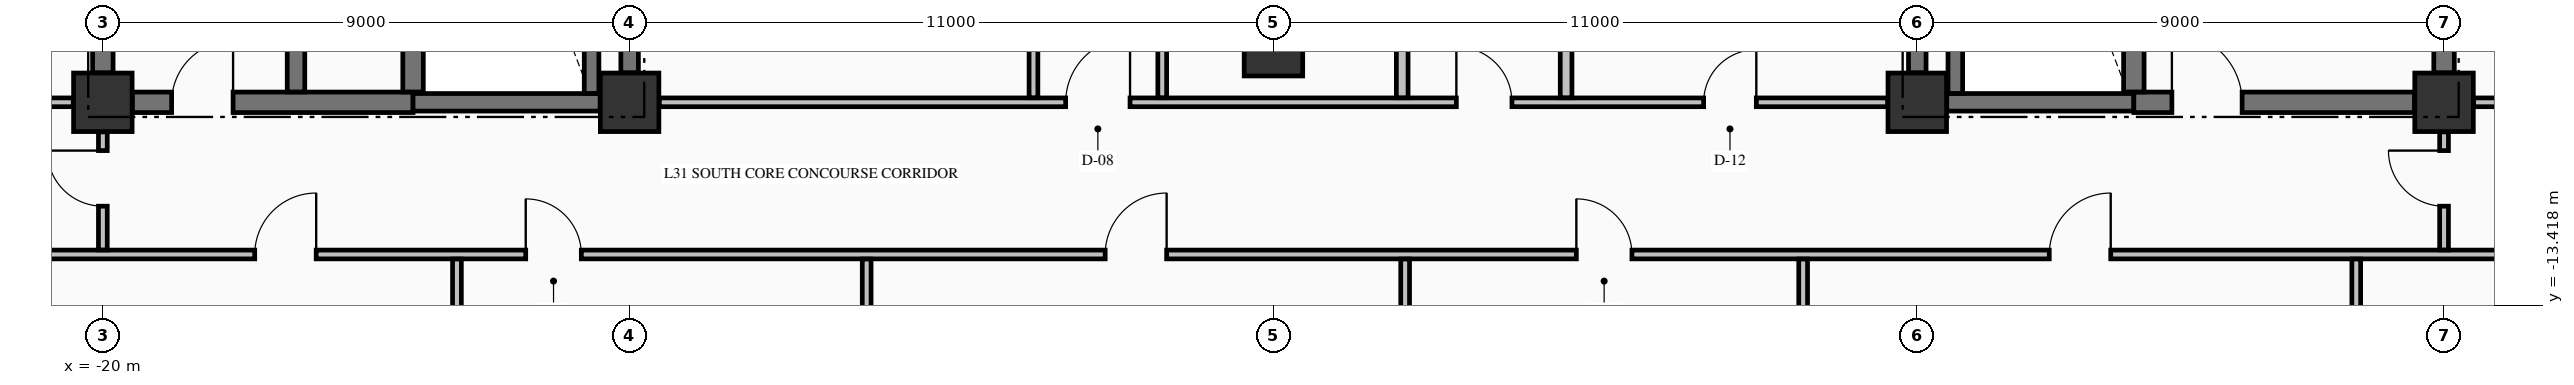
"""IFC4 building model, lengths in metres.
Left out: names, types, materials, properties, quantities, classifications, styles, units other than length and angle.
Written with IfcOpenShell. Run it as: python <this file> out.ifc"""

import sys

from ifc_helpers import new_model, si_unit, direction, frame, frame_2d, origin, origin_2d, place, context, subcontext, project, spatial, rectangle, extrude, element, fill, save


model = new_model("IFC4")
c1 = context("Model", 3, precision=1e-05, world=origin(), true_north=direction((0.0, 1.0)))
c2 = subcontext(c1, "Body", "Model", "MODEL_VIEW")
j1 = project(units=[si_unit("LENGTHUNIT", "METRE"), si_unit("PLANEANGLEUNIT", "RADIAN")], contexts=[c1])
p1 = place(None, origin())
s1 = spatial("IfcSite", under=j1, at=p1, CompositionType="ELEMENT")
p2 = place(p1, origin())
s2 = spatial("IfcBuilding", under=s1, at=p2, CompositionType="ELEMENT")
p3 = place(p2, frame((0.0, 0.0, 124.92)))
s3 = spatial("IfcBuildingStorey", under=s2, at=p3, CompositionType="ELEMENT", Elevation=124.92)
for number, where, z_axis, x_axis in (
    (1, (-20.0, -9.95, -0.25), (0.0, 0.0, 1.0), (1.0, 0.0, 0.0)),
    (2, (-11.0, -9.95, -0.25), (0.0, 0.0, 1.0), (1.0, 0.0, 0.0)),
    (3, (11.0, -9.95, -0.25), (0.0, 0.0, 1.0), (1.0, 0.0, 0.0)),
    (4, (20.0, -9.95, -0.25), (0.0, 0.0, 1.0), (1.0, 0.0, 0.0)),
    (5, (0.0, -9.0, -0.25), (0.0, 0.0, 1.0), (1.0, 0.0, 0.0)),
):
    element("IfcColumn", number, at=place(p3, frame(where, z_axis=z_axis, x_axis=x_axis)), inside=s3, PredefinedType="COLUMN", context=c2, shape_type="SweptSolid", body=[
        extrude(rectangle(XDim=1.0, YDim=1.0, at=origin_2d()), origin(), (0.0, 0.0, 1.0), 3.57),
    ])
p4 = place(p3, frame((-19.496, -9.95, 0.0), z_axis=(0.0, 0.0, 1.0), x_axis=(1.0, 0.0, 0.0)))
e6 = element("IfcWall", 6, at=p4, inside=s3, PredefinedType="SHEAR", context=c2, shape_type="SweptSolid", body=[
    extrude(rectangle(XDim=4.796, YDim=0.35, at=frame_2d((2.398, 0.0))), origin(), (0.0, 0.0, 1.0), 3.32),
])
p5 = place(p4, frame((0.671, 0.0, 0.0)))
e7 = element("IfcOpeningElement", 7, at=p5, cuts=e6, PredefinedType="OPENING", context=c2, shape_type="SweptSolid", body=[
    extrude(rectangle(XDim=1.05, YDim=2.15, at=frame_2d((0.525, 1.075))), frame((0.0, 0.185, 0.0), z_axis=(0.0, -1.0, 0.0), x_axis=(1.0, 0.0, 0.0)), (0.0, 0.0, 1.0), 0.37),
])
for number, where, z_axis, x_axis in (
    (8, (-14.7, -9.95, 0.0), (0.0, 0.0, 1.0), (1.0, 0.0, 0.0)),
    (9, (11.504, -9.95, 0.0), (0.0, 0.0, 1.0), (1.0, 0.0, 0.0)),
):
    element("IfcWall", number, at=place(p3, frame(where, z_axis=z_axis, x_axis=x_axis)), inside=s3, PredefinedType="SHEAR", context=c2, shape_type="SweptSolid", body=[
        extrude(rectangle(XDim=3.196, YDim=0.3, at=frame_2d((1.598, 0.0))), origin(), (0.0, 0.0, 1.0), 3.32),
    ])
p6 = place(p3, frame((14.7, -9.95, 0.0), z_axis=(0.0, 0.0, 1.0), x_axis=(1.0, 0.0, 0.0)))
e10 = element("IfcWall", 10, at=p6, inside=s3, PredefinedType="SHEAR", context=c2, shape_type="SweptSolid", body=[
    extrude(rectangle(XDim=4.796, YDim=0.35, at=frame_2d((2.398, 0.0))), origin(), (0.0, 0.0, 1.0), 3.32),
])
p7 = place(p6, frame((0.65, 0.0, 0.0)))
e11 = element("IfcOpeningElement", 11, at=p7, cuts=e10, PredefinedType="OPENING", context=c2, shape_type="SweptSolid", body=[
    extrude(rectangle(XDim=1.2, YDim=2.15, at=frame_2d((0.6, 1.075))), frame((0.0, 0.185, 0.0), z_axis=(0.0, -1.0, 0.0), x_axis=(1.0, 0.0, 0.0)), (0.0, 0.0, 1.0), 0.37),
])
p8 = place(p3, frame((-27.835, -12.55, 0.0), z_axis=(0.0, 0.0, 1.0), x_axis=(1.0, 0.0, 0.0)))
e12 = element("IfcWall", 12, at=p8, inside=s3, PredefinedType="PARTITIONING", context=c2, shape_type="SweptSolid", body=[
    extrude(rectangle(XDim=50.67, YDim=0.15, at=frame_2d((25.335, 0.0))), origin(), (0.0, 0.0, 1.0), 3.32),
])
p9 = place(p8, frame((10.43, 0.0, 0.0)))
e13 = element("IfcOpeningElement", 13, at=p9, cuts=e12, PredefinedType="OPENING", context=c2, shape_type="SweptSolid", body=[
    extrude(rectangle(XDim=1.05, YDim=2.15, at=frame_2d((0.525, 1.075))), frame((0.0, 0.085, 0.0), z_axis=(0.0, -1.0, 0.0), x_axis=(1.0, 0.0, 0.0)), (0.0, 0.0, 1.0), 0.17),
])
p10 = place(p8, frame((15.06, 0.0, 0.0)))
e14 = element("IfcOpeningElement", 14, at=p10, cuts=e12, PredefinedType="OPENING", context=c2, shape_type="SweptSolid", body=[
    extrude(rectangle(XDim=0.95, YDim=2.15, at=frame_2d((0.475, 1.075))), frame((0.0, 0.085, 0.0), z_axis=(0.0, -1.0, 0.0), x_axis=(1.0, 0.0, 0.0)), (0.0, 0.0, 1.0), 0.17),
])
p11 = place(p8, frame((24.96, 0.0, 0.0)))
e15 = element("IfcOpeningElement", 15, at=p11, cuts=e12, PredefinedType="OPENING", context=c2, shape_type="SweptSolid", body=[
    extrude(rectangle(XDim=1.05, YDim=2.15, at=frame_2d((0.525, 1.075))), frame((0.0, 0.085, 0.0), z_axis=(0.0, -1.0, 0.0), x_axis=(1.0, 0.0, 0.0)), (0.0, 0.0, 1.0), 0.17),
])
p12 = place(p8, frame((33.01, 0.0, 0.0)))
e16 = element("IfcOpeningElement", 16, at=p12, cuts=e12, PredefinedType="OPENING", context=c2, shape_type="SweptSolid", body=[
    extrude(rectangle(XDim=0.95, YDim=2.15, at=frame_2d((0.475, 1.075))), frame((0.0, 0.085, 0.0), z_axis=(0.0, -1.0, 0.0), x_axis=(1.0, 0.0, 0.0)), (0.0, 0.0, 1.0), 0.17),
])
p13 = place(p8, frame((41.09, 0.0, 0.0)))
e17 = element("IfcOpeningElement", 17, at=p13, cuts=e12, PredefinedType="OPENING", context=c2, shape_type="SweptSolid", body=[
    extrude(rectangle(XDim=1.05, YDim=2.15, at=frame_2d((0.525, 1.075))), frame((0.0, 0.085, 0.0), z_axis=(0.0, -1.0, 0.0), x_axis=(1.0, 0.0, 0.0)), (0.0, 0.0, 1.0), 0.17),
])
p14 = place(p3, frame((-27.835, -9.95, 0.0), z_axis=(0.0, 0.0, 1.0), x_axis=(1.0, 0.0, 0.0)))
e18 = element("IfcWall", 18, at=p14, inside=s3, PredefinedType="PARTITIONING", context=c2, shape_type="SweptSolid", body=[
    extrude(rectangle(XDim=7.329, YDim=0.15, at=frame_2d((3.665, 0.0))), origin(), (0.0, 0.0, 1.0), 3.32),
])
p15 = place(p14, frame((3.335, 0.0, 0.0)))
e19 = element("IfcOpeningElement", 19, at=p15, cuts=e18, PredefinedType="OPENING", context=c2, shape_type="SweptSolid", body=[
    extrude(rectangle(XDim=1.0, YDim=2.15, at=frame_2d((0.5, 1.075))), frame((0.0, 0.085, 0.0), z_axis=(0.0, -1.0, 0.0), x_axis=(1.0, 0.0, 0.0)), (0.0, 0.0, 1.0), 0.17),
])
p16 = place(p3, frame((-10.494, -9.95, 0.0), z_axis=(0.0, 0.0, 1.0), x_axis=(1.0, 0.0, 0.0)))
e20 = element("IfcWall", 20, at=p16, inside=s3, PredefinedType="PARTITIONING", context=c2, shape_type="SweptSolid", body=[
    extrude(rectangle(XDim=20.988, YDim=0.15, at=frame_2d((10.494, 0.0))), origin(), (0.0, 0.0, 1.0), 3.32),
])
p17 = place(p16, frame((6.944, 0.0, 0.0)))
e21 = element("IfcOpeningElement", 21, at=p17, cuts=e20, PredefinedType="OPENING", context=c2, shape_type="SweptSolid", body=[
    extrude(rectangle(XDim=1.1, YDim=2.15, at=frame_2d((0.55, 1.075))), frame((0.0, 0.085, 0.0), z_axis=(0.0, -1.0, 0.0), x_axis=(1.0, 0.0, 0.0)), (0.0, 0.0, 1.0), 0.17),
])
p18 = place(p16, frame((13.619, 0.0, 0.0)))
e22 = element("IfcOpeningElement", 22, at=p18, cuts=e20, PredefinedType="OPENING", context=c2, shape_type="SweptSolid", body=[
    extrude(rectangle(XDim=0.95, YDim=2.15, at=frame_2d((0.475, 1.075))), frame((0.0, 0.085, 0.0), z_axis=(0.0, -1.0, 0.0), x_axis=(1.0, 0.0, 0.0)), (0.0, 0.0, 1.0), 0.17),
])
p19 = place(p16, frame((17.844, 0.0, 0.0)))
e23 = element("IfcOpeningElement", 23, at=p19, cuts=e20, PredefinedType="OPENING", context=c2, shape_type="SweptSolid", body=[
    extrude(rectangle(XDim=0.9, YDim=2.15, at=frame_2d((0.45, 1.075))), frame((0.0, 0.085, 0.0), z_axis=(0.0, -1.0, 0.0), x_axis=(1.0, 0.0, 0.0)), (0.0, 0.0, 1.0), 0.17),
])
p20 = place(p3, frame((20.506, -9.95, 0.0), z_axis=(0.0, 0.0, 1.0), x_axis=(1.0, 0.0, 0.0)))
e24 = element("IfcWall", 24, at=p20, inside=s3, PredefinedType="PARTITIONING", context=c2, shape_type="SweptSolid", body=[
    extrude(rectangle(XDim=2.329, YDim=0.15, at=frame_2d((1.165, 0.0))), origin(), (0.0, 0.0, 1.0), 3.32),
])
p21 = place(p20, frame((0.519, 0.0, 0.0)))
e25 = element("IfcOpeningElement", 25, at=p21, cuts=e24, PredefinedType="OPENING", context=c2, shape_type="SweptSolid", body=[
    extrude(rectangle(XDim=0.95, YDim=2.15, at=frame_2d((0.475, 1.075))), frame((0.0, 0.085, 0.0), z_axis=(0.0, -1.0, 0.0), x_axis=(1.0, 0.0, 0.0)), (0.0, 0.0, 1.0), 0.17),
])
p22 = place(p3, frame((-20.0, -9.446, 0.0), z_axis=(0.0, 0.0, 1.0), x_axis=(0.0, 1.0, 0.0)))
e26 = element("IfcWall", 26, at=p22, inside=s3, PredefinedType="SHEAR", context=c2, shape_type="SweptSolid", body=[
    extrude(rectangle(XDim=8.942, YDim=0.35, at=frame_2d((4.471, 0.0))), origin(), (0.0, 0.0, 1.0), 3.32),
])
p23 = place(p3, frame((-16.7, -9.773, 0.0), z_axis=(0.0, 0.0, 1.0), x_axis=(0.0, 1.0, 0.0)))
e27 = element("IfcWall", 27, at=p23, inside=s3, PredefinedType="SHEAR", context=c2, shape_type="SweptSolid", body=[
    extrude(rectangle(XDim=9.371, YDim=0.3, at=frame_2d((4.686, 0.0))), origin(), (0.0, 0.0, 1.0), 3.32),
])
p24 = place(p3, frame((-14.7, -9.773, 0.0), z_axis=(0.0, 0.0, 1.0), x_axis=(0.0, 1.0, 0.0)))
e28 = element("IfcWall", 28, at=p24, inside=s3, PredefinedType="SHEAR", context=c2, shape_type="SweptSolid", body=[
    extrude(rectangle(XDim=9.371, YDim=0.35, at=frame_2d((4.686, 0.0))), origin(), (0.0, 0.0, 1.0), 3.32),
])
p25 = place(p3, frame((-11.65, -9.798, 0.0), z_axis=(0.0, 0.0, 1.0), x_axis=(0.0, 1.0, 0.0)))
e29 = element("IfcWall", 29, at=p25, inside=s3, PredefinedType="SOLIDWALL", context=c2, shape_type="SweptSolid", body=[
    extrude(rectangle(XDim=9.396, YDim=0.25, at=frame_2d((4.698, 0.0))), origin(), (0.0, 0.0, 1.0), 3.32),
])
for number, where, z_axis, x_axis in (
    (30, (-11.0, -9.446, 0.0), (0.0, 0.0, 1.0), (0.0, 1.0, 0.0)),
    (31, (11.0, -9.446, 0.0), (0.0, 0.0, 1.0), (0.0, 1.0, 0.0)),
):
    element("IfcWall", number, at=place(p3, frame(where, z_axis=z_axis, x_axis=x_axis)), inside=s3, PredefinedType="SHEAR", context=c2, shape_type="SweptSolid", body=[
        extrude(rectangle(XDim=8.942, YDim=0.3, at=frame_2d((4.471, 0.0))), origin(), (0.0, 0.0, 1.0), 3.32),
    ])
p26 = place(p3, frame((11.65, -9.798, 0.0), z_axis=(0.0, 0.0, 1.0), x_axis=(0.0, 1.0, 0.0)))
e32 = element("IfcWall", 32, at=p26, inside=s3, PredefinedType="SOLIDWALL", context=c2, shape_type="SweptSolid", body=[
    extrude(rectangle(XDim=9.396, YDim=0.25, at=frame_2d((4.698, 0.0))), origin(), (0.0, 0.0, 1.0), 3.32),
])
p27 = place(p3, frame((14.7, -9.773, 0.0), z_axis=(0.0, 0.0, 1.0), x_axis=(0.0, 1.0, 0.0)))
e33 = element("IfcWall", 33, at=p27, inside=s3, PredefinedType="SHEAR", context=c2, shape_type="SweptSolid", body=[
    extrude(rectangle(XDim=9.371, YDim=0.35, at=frame_2d((4.686, 0.0))), origin(), (0.0, 0.0, 1.0), 3.32),
])
p28 = place(p3, frame((20.0, -9.446, 0.0), z_axis=(0.0, 0.0, 1.0), x_axis=(0.0, 1.0, 0.0)))
e34 = element("IfcWall", 34, at=p28, inside=s3, PredefinedType="SHEAR", context=c2, shape_type="SweptSolid", body=[
    extrude(rectangle(XDim=2.269, YDim=0.35, at=frame_2d((1.135, 0.0))), origin(), (0.0, 0.0, 1.0), 3.32),
])
p29 = place(p3, frame((-20.0, -12.472, 0.0), z_axis=(0.0, 0.0, 1.0), x_axis=(0.0, 1.0, 0.0)))
e35 = element("IfcWall", 35, at=p29, inside=s3, PredefinedType="PARTITIONING", context=c2, shape_type="SweptSolid", body=[
    extrude(rectangle(XDim=2.016, YDim=0.15, at=frame_2d((1.008, 0.0))), origin(), (0.0, 0.0, 1.0), 2.81),
])
p30 = place(p29, frame((0.747, 0.0, 0.0)))
e36 = element("IfcOpeningElement", 36, at=p30, cuts=e35, PredefinedType="OPENING", context=c2, shape_type="SweptSolid", body=[
    extrude(rectangle(XDim=0.95, YDim=2.15, at=frame_2d((0.475, 1.075))), frame((0.0, 0.085, 0.0), z_axis=(0.0, -1.0, 0.0), x_axis=(1.0, 0.0, 0.0)), (0.0, 0.0, 1.0), 0.17),
])
for number, where, z_axis, x_axis in (
    (37, (-13.95, -25.335, 0.0), (0.0, 0.0, 1.0), (0.0, 1.0, 0.0)),
    (38, (-6.95, -25.335, 0.0), (0.0, 0.0, 1.0), (0.0, 1.0, 0.0)),
):
    element("IfcWall", number, at=place(p3, frame(where, z_axis=z_axis, x_axis=x_axis)), inside=s3, PredefinedType="PARTITIONING", context=c2, shape_type="SweptSolid", body=[
        extrude(rectangle(XDim=12.707, YDim=0.15, at=frame_2d((6.354, 0.0))), origin(), (0.0, 0.0, 1.0), 3.32),
    ])
p31 = place(p3, frame((-4.1, -9.872, 0.0), z_axis=(0.0, 0.0, 1.0), x_axis=(0.0, 1.0, 0.0)))
e39 = element("IfcWall", 39, at=p31, inside=s3, PredefinedType="PARTITIONING", context=c2, shape_type="SweptSolid", body=[
    extrude(rectangle(XDim=9.544, YDim=0.15, at=frame_2d((4.772, 0.0))), origin(), (0.0, 0.0, 1.0), 3.32),
])
p32 = place(p3, frame((-1.9, -9.872, 0.0), z_axis=(0.0, 0.0, 1.0), x_axis=(0.0, 1.0, 0.0)))
e40 = element("IfcWall", 40, at=p32, inside=s3, PredefinedType="PARTITIONING", context=c2, shape_type="SweptSolid", body=[
    extrude(rectangle(XDim=4.919, YDim=0.15, at=frame_2d((2.459, 0.0))), origin(), (0.0, 0.0, 1.0), 3.32),
])
p33 = place(p32, frame((2.597, 0.0, 0.0)))
e41 = element("IfcOpeningElement", 41, at=p33, cuts=e40, PredefinedType="OPENING", context=c2, shape_type="SweptSolid", body=[
    extrude(rectangle(XDim=0.95, YDim=2.15, at=frame_2d((0.475, 1.075))), frame((0.0, 0.085, 0.0), z_axis=(0.0, -1.0, 0.0), x_axis=(1.0, 0.0, 0.0)), (0.0, 0.0, 1.0), 0.17),
])
p34 = place(p3, frame((2.2, -9.872, 0.0), z_axis=(0.0, 0.0, 1.0), x_axis=(0.0, 1.0, 0.0)))
e42 = element("IfcWall", 42, at=p34, inside=s3, PredefinedType="PARTITIONING", context=c2, shape_type="SweptSolid", body=[
    extrude(rectangle(XDim=4.919, YDim=0.2, at=frame_2d((2.459, 0.0))), origin(), (0.0, 0.0, 1.0), 3.32),
])
p35 = place(p3, frame((2.25, -25.335, 0.0), z_axis=(0.0, 0.0, 1.0), x_axis=(0.0, 1.0, 0.0)))
e43 = element("IfcWall", 43, at=p35, inside=s3, PredefinedType="PARTITIONING", context=c2, shape_type="SweptSolid", body=[
    extrude(rectangle(XDim=12.707, YDim=0.15, at=frame_2d((6.354, 0.0))), origin(), (0.0, 0.0, 1.0), 3.32),
])
p36 = place(p3, frame((5.0, -9.872, 0.0), z_axis=(0.0, 0.0, 1.0), x_axis=(0.0, 1.0, 0.0)))
e44 = element("IfcWall", 44, at=p36, inside=s3, PredefinedType="PARTITIONING", context=c2, shape_type="SweptSolid", body=[
    extrude(rectangle(XDim=4.919, YDim=0.2, at=frame_2d((2.459, 0.0))), origin(), (0.0, 0.0, 1.0), 3.32),
])
p37 = place(p3, frame((9.05, -25.335, 0.0), z_axis=(0.0, 0.0, 1.0), x_axis=(0.0, 1.0, 0.0)))
e45 = element("IfcWall", 45, at=p37, inside=s3, PredefinedType="PARTITIONING", context=c2, shape_type="SweptSolid", body=[
    extrude(rectangle(XDim=12.707, YDim=0.15, at=frame_2d((6.354, 0.0))), origin(), (0.0, 0.0, 1.0), 3.32),
])
p38 = place(p3, frame((18.5, -20.394, 0.0), z_axis=(0.0, 0.0, 1.0), x_axis=(0.0, 1.0, 0.0)))
e46 = element("IfcWall", 46, at=p38, inside=s3, PredefinedType="PARTITIONING", context=c2, shape_type="SweptSolid", body=[
    extrude(rectangle(XDim=7.766, YDim=0.15, at=frame_2d((3.883, 0.0))), origin(), (0.0, 0.0, 1.0), 3.32),
])
p39 = place(p3, frame((20.0, -12.472, 0.0), z_axis=(0.0, 0.0, 1.0), x_axis=(0.0, 1.0, 0.0)))
e47 = element("IfcWall", 47, at=p39, inside=s3, PredefinedType="PARTITIONING", context=c2, shape_type="SweptSolid", body=[
    extrude(rectangle(XDim=2.016, YDim=0.15, at=frame_2d((1.008, 0.0))), origin(), (0.0, 0.0, 1.0), 2.81),
])
p40 = place(p39, frame((0.747, 0.0, 0.0)))
e48 = element("IfcOpeningElement", 48, at=p40, cuts=e47, PredefinedType="OPENING", context=c2, shape_type="SweptSolid", body=[
    extrude(rectangle(XDim=0.95, YDim=2.15, at=frame_2d((0.475, 1.075))), frame((0.0, 0.085, 0.0), z_axis=(0.0, -1.0, 0.0), x_axis=(1.0, 0.0, 0.0)), (0.0, 0.0, 1.0), 0.17),
])
p41 = place(p5, origin())
e49 = element("IfcDoor", 49, at=p41, inside=s3, OperationType="SINGLE_SWING_RIGHT", PredefinedType="DOOR", context=c2, shape_type="SweptSolid", body=[
    extrude(rectangle(XDim=1.05, YDim=2.15, at=frame_2d((0.525, 1.075))), frame((0.0, 0.025, 0.0), z_axis=(0.0, -1.0, 0.0), x_axis=(1.0, 0.0, 0.0)), (0.0, 0.0, 1.0), 0.05),
])
fill(e7, e49)
p42 = place(p7, origin())
e50 = element("IfcDoor", 50, at=p42, inside=s3, OperationType="SINGLE_SWING_LEFT", PredefinedType="DOOR", context=c2, shape_type="SweptSolid", body=[
    extrude(rectangle(XDim=1.2, YDim=2.15, at=frame_2d((0.6, 1.075))), frame((0.0, 0.025, 0.0), z_axis=(0.0, -1.0, 0.0), x_axis=(1.0, 0.0, 0.0)), (0.0, 0.0, 1.0), 0.05),
])
fill(e11, e50)
p43 = place(p17, origin())
e51 = element("IfcDoor", 51, at=p43, inside=s3, OperationType="SINGLE_SWING_RIGHT", PredefinedType="DOOR", context=c2, shape_type="SweptSolid", body=[
    extrude(rectangle(XDim=1.1, YDim=2.15, at=frame_2d((0.55, 1.075))), frame((0.0, 0.025, 0.0), z_axis=(0.0, -1.0, 0.0), x_axis=(1.0, 0.0, 0.0)), (0.0, 0.0, 1.0), 0.05),
])
fill(e21, e51)
p44 = place(p9, origin())
e52 = element("IfcDoor", 52, at=p44, inside=s3, OperationType="SINGLE_SWING_RIGHT", PredefinedType="DOOR", context=c2, shape_type="SweptSolid", body=[
    extrude(rectangle(XDim=1.05, YDim=2.15, at=frame_2d((0.525, 1.075))), frame((0.0, 0.025, 0.0), z_axis=(0.0, -1.0, 0.0), x_axis=(1.0, 0.0, 0.0)), (0.0, 0.0, 1.0), 0.05),
])
fill(e13, e52)
p45 = place(p10, origin())
e53 = element("IfcDoor", 53, at=p45, inside=s3, OperationType="SINGLE_SWING_LEFT", PredefinedType="DOOR", context=c2, shape_type="SweptSolid", body=[
    extrude(rectangle(XDim=0.95, YDim=2.15, at=frame_2d((0.475, 1.075))), frame((0.0, 0.025, 0.0), z_axis=(0.0, -1.0, 0.0), x_axis=(1.0, 0.0, 0.0)), (0.0, 0.0, 1.0), 0.05),
])
fill(e14, e53)
p46 = place(p11, origin())
e54 = element("IfcDoor", 54, at=p46, inside=s3, OperationType="SINGLE_SWING_RIGHT", PredefinedType="DOOR", context=c2, shape_type="SweptSolid", body=[
    extrude(rectangle(XDim=1.05, YDim=2.15, at=frame_2d((0.525, 1.075))), frame((0.0, 0.025, 0.0), z_axis=(0.0, -1.0, 0.0), x_axis=(1.0, 0.0, 0.0)), (0.0, 0.0, 1.0), 0.05),
])
fill(e15, e54)
p47 = place(p12, origin())
e55 = element("IfcDoor", 55, at=p47, inside=s3, OperationType="SINGLE_SWING_LEFT", PredefinedType="DOOR", context=c2, shape_type="SweptSolid", body=[
    extrude(rectangle(XDim=0.95, YDim=2.15, at=frame_2d((0.475, 1.075))), frame((0.0, 0.025, 0.0), z_axis=(0.0, -1.0, 0.0), x_axis=(1.0, 0.0, 0.0)), (0.0, 0.0, 1.0), 0.05),
])
fill(e16, e55)
p48 = place(p13, origin())
e56 = element("IfcDoor", 56, at=p48, inside=s3, OperationType="SINGLE_SWING_RIGHT", PredefinedType="DOOR", context=c2, shape_type="SweptSolid", body=[
    extrude(rectangle(XDim=1.05, YDim=2.15, at=frame_2d((0.525, 1.075))), frame((0.0, 0.025, 0.0), z_axis=(0.0, -1.0, 0.0), x_axis=(1.0, 0.0, 0.0)), (0.0, 0.0, 1.0), 0.05),
])
fill(e17, e56)
p49 = place(p18, origin())
e57 = element("IfcDoor", 57, at=p49, inside=s3, OperationType="SINGLE_SWING_LEFT", PredefinedType="DOOR", context=c2, shape_type="SweptSolid", body=[
    extrude(rectangle(XDim=0.95, YDim=2.15, at=frame_2d((0.475, 1.075))), frame((0.0, 0.025, 0.0), z_axis=(0.0, -1.0, 0.0), x_axis=(1.0, 0.0, 0.0)), (0.0, 0.0, 1.0), 0.05),
])
fill(e22, e57)
p50 = place(p19, origin())
e58 = element("IfcDoor", 58, at=p50, inside=s3, OperationType="SINGLE_SWING_RIGHT", PredefinedType="DOOR", context=c2, shape_type="SweptSolid", body=[
    extrude(rectangle(XDim=0.9, YDim=2.15, at=frame_2d((0.45, 1.075))), frame((0.0, 0.025, 0.0), z_axis=(0.0, -1.0, 0.0), x_axis=(1.0, 0.0, 0.0)), (0.0, 0.0, 1.0), 0.05),
])
fill(e23, e58)
p51 = place(p30, origin())
e59 = element("IfcDoor", 59, at=p51, inside=s3, OperationType="SINGLE_SWING_RIGHT", PredefinedType="DOOR", context=c2, shape_type="SweptSolid", body=[
    extrude(rectangle(XDim=0.95, YDim=2.15, at=frame_2d((0.475, 1.075))), frame((0.0, 0.025, 0.0), z_axis=(0.0, -1.0, 0.0), x_axis=(1.0, 0.0, 0.0)), (0.0, 0.0, 1.0), 0.05),
])
fill(e36, e59)
p52 = place(p40, origin())
e60 = element("IfcDoor", 60, at=p52, inside=s3, OperationType="SINGLE_SWING_RIGHT", PredefinedType="DOOR", context=c2, shape_type="SweptSolid", body=[
    extrude(rectangle(XDim=0.95, YDim=2.15, at=frame_2d((0.475, 1.075))), frame((0.0, 0.025, 0.0), z_axis=(0.0, -1.0, 0.0), x_axis=(1.0, 0.0, 0.0)), (0.0, 0.0, 1.0), 0.05),
])
fill(e48, e60)
save(model, sys.argv[1])
